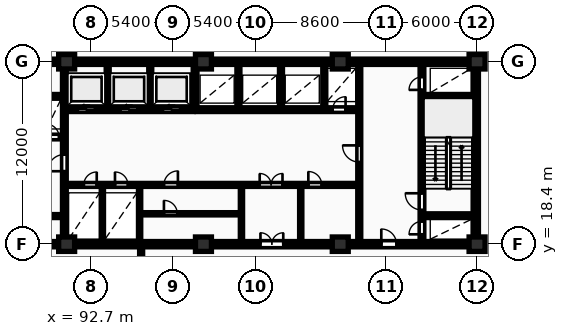
"""IFC4 building model, lengths in metres.
Left out: names, types, materials, properties, quantities, classifications, styles, units other than length and angle.
Written with IfcOpenShell. Run it as: python <this file> out.ifc"""

import sys

from ifc_helpers import new_model, si_unit, direction, frame, frame_2d, origin, origin_2d, place, context, subcontext, project, spatial, rectangle, extrude, element, fill, save


model = new_model("IFC4")
c1 = context("Model", 3, precision=1e-05, world=origin(), true_north=direction((0.0, 1.0)))
c2 = subcontext(c1, "Body", "Model", "MODEL_VIEW")
j1 = project(units=[si_unit("LENGTHUNIT", "METRE"), si_unit("PLANEANGLEUNIT", "RADIAN")], contexts=[c1])
p1 = place(None, origin())
s1 = spatial("IfcSite", under=j1, at=p1, CompositionType="ELEMENT")
p2 = place(p1, origin())
s2 = spatial("IfcBuilding", under=s1, at=p2, CompositionType="ELEMENT")
p3 = place(p2, frame((0.0, 0.0, 5.4)))
s3 = spatial("IfcBuildingStorey", under=s2, at=p3, CompositionType="ELEMENT", Elevation=5.4)
for number, where, z_axis, x_axis in (
    (1, (91.1, 18.4, 0.0), (0.0, 0.0, 1.0), (1.0, 0.0, 0.0)),
    (2, (91.1, 30.4, 0.0), (0.0, 0.0, 1.0), (1.0, 0.0, 0.0)),
    (3, (100.1, 18.4, 0.0), (0.0, 0.0, 1.0), (1.0, 0.0, 0.0)),
    (4, (100.1, 30.4, 0.0), (0.0, 0.0, 1.0), (1.0, 0.0, 0.0)),
    (5, (109.1, 18.4, 0.0), (0.0, 0.0, 1.0), (1.0, 0.0, 0.0)),
    (6, (109.1, 30.4, 0.0), (0.0, 0.0, 1.0), (1.0, 0.0, 0.0)),
    (7, (118.1, 18.4, 0.0), (0.0, 0.0, 1.0), (1.0, 0.0, 0.0)),
    (8, (118.1, 30.4, 0.0), (0.0, 0.0, 1.0), (1.0, 0.0, 0.0)),
):
    element("IfcColumn", number, at=place(p3, frame(where, z_axis=z_axis, x_axis=x_axis)), inside=s3, PredefinedType="COLUMN", context=c2, shape_type="SweptSolid", body=[
        extrude(rectangle(XDim=1.05, YDim=0.95, at=origin_2d()), origin(), (0.0, 0.0, 1.0), 4.6),
    ])
p4 = place(p3, frame((81.925, 30.4, 0.0), z_axis=(0.0, 0.0, 1.0), x_axis=(1.0, 0.0, 0.0)))
e9 = element("IfcWall", 9, at=p4, inside=s3, PredefinedType="SHEAR", context=c2, shape_type="SweptSolid", body=[
    extrude(rectangle(XDim=36.265, YDim=0.35, at=frame_2d((18.132, 0.0))), origin(), (0.0, 0.0, 1.0), 4.6),
])
p5 = place(p3, frame((118.015, 18.575, 0.0), z_axis=(0.0, 0.0, 1.0), x_axis=(0.0, 1.0, 0.0)))
e10 = element("IfcWall", 10, at=p5, inside=s3, PredefinedType="SHEAR", context=c2, shape_type="SweptSolid", body=[
    extrude(rectangle(XDim=11.65, YDim=0.35, at=frame_2d((5.825, 0.0))), origin(), (0.0, 0.0, 1.0), 4.6),
])
p6 = place(p3, frame((81.925, 18.4, 0.0), z_axis=(0.0, 0.0, 1.0), x_axis=(1.0, 0.0, 0.0)))
e11 = element("IfcWall", 11, at=p6, inside=s3, PredefinedType="SHEAR", context=c2, shape_type="SweptSolid", body=[
    extrude(rectangle(XDim=36.265, YDim=0.35, at=frame_2d((18.132, 0.0))), origin(), (0.0, 0.0, 1.0), 4.6),
])
p7 = place(p6, frame((5.675, 0.0, 0.0)))
e12 = element("IfcOpeningElement", 12, at=p7, cuts=e11, PredefinedType="OPENING", context=c2, shape_type="SweptSolid", body=[
    extrude(rectangle(XDim=1.0, YDim=2.15, at=frame_2d((0.5, 1.075))), frame((0.0, 0.185, 0.0), z_axis=(0.0, -1.0, 0.0), x_axis=(1.0, 0.0, 0.0)), (0.0, 0.0, 1.0), 0.37),
])
p8 = place(p6, frame((21.925, 0.0, 0.0)))
e13 = element("IfcOpeningElement", 13, at=p8, cuts=e11, PredefinedType="OPENING", context=c2, shape_type="SweptSolid", body=[
    extrude(rectangle(XDim=1.5, YDim=2.2, at=frame_2d((0.75, 1.1))), frame((0.0, 0.185, 0.0), z_axis=(0.0, -1.0, 0.0), x_axis=(1.0, 0.0, 0.0)), (0.0, 0.0, 1.0), 0.37),
])
p9 = place(p6, frame((29.875, 0.0, 0.0)))
e14 = element("IfcOpeningElement", 14, at=p9, cuts=e11, PredefinedType="OPENING", context=c2, shape_type="SweptSolid", body=[
    extrude(rectangle(XDim=1.0, YDim=2.15, at=frame_2d((0.5, 1.075))), frame((0.0, 0.185, 0.0), z_axis=(0.0, -1.0, 0.0), x_axis=(1.0, 0.0, 0.0)), (0.0, 0.0, 1.0), 0.37),
])
p10 = place(p3, frame((83.0, 28.125, 0.0), z_axis=(0.0, 0.0, 1.0), x_axis=(1.0, 0.0, 0.0)))
e15 = element("IfcWall", 15, at=p10, inside=s3, PredefinedType="SHEAR", context=c2, shape_type="SweptSolid", body=[
    extrude(rectangle(XDim=7.82, YDim=0.25, at=frame_2d((3.91, 0.0))), origin(), (0.0, 0.0, 1.0), 4.6),
])
p11 = place(p3, frame((86.5, 25.45, 0.0), z_axis=(0.0, 0.0, 1.0), x_axis=(1.0, 0.0, 0.0)))
e16 = element("IfcWall", 16, at=p11, inside=s3, PredefinedType="SHEAR", context=c2, shape_type="SweptSolid", body=[
    extrude(rectangle(XDim=4.32, YDim=0.25, at=frame_2d((2.16, 0.0))), origin(), (0.0, 0.0, 1.0), 4.6),
])
p12 = place(p11, frame((1.14, 0.0, 0.0)))
e17 = element("IfcOpeningElement", 17, at=p12, cuts=e16, PredefinedType="OPENING", context=c2, shape_type="SweptSolid", body=[
    extrude(rectangle(XDim=1.12, YDim=2.12, at=frame_2d((0.56, 1.06))), frame((0.0, 0.135, 0.0), z_axis=(0.0, -1.0, 0.0), x_axis=(1.0, 0.0, 0.0)), (0.0, 0.0, 1.0), 0.27),
])
p13 = place(p11, frame((3.25, 0.0, 0.0)))
e18 = element("IfcOpeningElement", 18, at=p13, cuts=e16, PredefinedType="OPENING", context=c2, shape_type="SweptSolid", body=[
    extrude(rectangle(XDim=0.85, YDim=2.05, at=frame_2d((0.425, 1.025))), frame((0.0, 0.135, 0.0), z_axis=(0.0, -1.0, 0.0), x_axis=(1.0, 0.0, 0.0)), (0.0, 0.0, 1.0), 0.27),
])
p14 = place(p3, frame((86.5, 20.25, 0.0), z_axis=(0.0, 0.0, 1.0), x_axis=(1.0, 0.0, 0.0)))
e19 = element("IfcWall", 19, at=p14, inside=s3, PredefinedType="PARTITIONING", context=c2, shape_type="SweptSolid", body=[
    extrude(rectangle(XDim=4.32, YDim=0.2, at=frame_2d((2.16, 0.0))), origin(), (0.0, 0.0, 1.0), 4.3),
])
p15 = place(p14, frame((1.4, 0.0, 0.0)))
e20 = element("IfcOpeningElement", 20, at=p15, cuts=e19, PredefinedType="OPENING", context=c2, shape_type="SweptSolid", body=[
    extrude(rectangle(XDim=1.1, YDim=2.1, at=frame_2d((0.55, 1.05))), frame((0.0, 0.11, 0.0), z_axis=(0.0, -1.0, 0.0), x_axis=(1.0, 0.0, 0.0)), (0.0, 0.0, 1.0), 0.22),
])
p16 = place(p3, frame((90.95, 18.6, 0.0), z_axis=(0.0, 0.0, 1.0), x_axis=(0.0, 1.0, 0.0)))
e21 = element("IfcWall", 21, at=p16, inside=s3, PredefinedType="SHEAR", context=c2, shape_type="SweptSolid", body=[
    extrude(rectangle(XDim=11.6, YDim=0.25, at=frame_2d((5.8, 0.0))), origin(), (0.0, 0.0, 1.0), 4.6),
])
p17 = place(p16, frame((4.6, 0.0, 0.0)))
e22 = element("IfcOpeningElement", 22, at=p17, cuts=e21, PredefinedType="OPENING", context=c2, shape_type="SweptSolid", body=[
    extrude(rectangle(XDim=1.1, YDim=2.1, at=frame_2d((0.55, 1.05))), frame((0.0, 0.135, 0.0), z_axis=(0.0, -1.0, 0.0), x_axis=(1.0, 0.0, 0.0)), (0.0, 0.0, 1.0), 0.27),
])
for number, where, z_axis, x_axis in (
    (23, (93.8, 27.38, 0.0), (0.0, 0.0, 1.0), (0.0, 1.0, 0.0)),
    (24, (96.6, 27.38, 0.0), (0.0, 0.0, 1.0), (0.0, 1.0, 0.0)),
):
    element("IfcWall", number, at=place(p3, frame(where, z_axis=z_axis, x_axis=x_axis)), inside=s3, PredefinedType="PARTITIONING", context=c2, shape_type="SweptSolid", body=[
        extrude(rectangle(XDim=2.82, YDim=0.2, at=frame_2d((1.41, 0.0))), origin(), (0.0, 0.0, 1.0), 4.3),
    ])
p18 = place(p3, frame((91.08, 27.25, 0.0), z_axis=(0.0, 0.0, 1.0), x_axis=(1.0, 0.0, 0.0)))
e25 = element("IfcWall", 25, at=p18, inside=s3, PredefinedType="SHEAR", context=c2, shape_type="SweptSolid", body=[
    extrude(rectangle(XDim=8.34, YDim=0.25, at=frame_2d((4.17, 0.0))), origin(), (0.0, 0.0, 1.0), 4.6),
])
p19 = place(p18, frame((0.76, 0.0, 0.0)))
e26 = element("IfcOpeningElement", 26, at=p19, cuts=e25, PredefinedType="OPENING", context=c2, shape_type="SweptSolid", body=[
    extrude(rectangle(XDim=1.12, YDim=2.12, at=frame_2d((0.56, 1.06))), frame((0.0, 0.135, 0.0), z_axis=(0.0, -1.0, 0.0), x_axis=(1.0, 0.0, 0.0)), (0.0, 0.0, 1.0), 0.27),
])
p20 = place(p18, frame((3.56, 0.0, 0.0)))
e27 = element("IfcOpeningElement", 27, at=p20, cuts=e25, PredefinedType="OPENING", context=c2, shape_type="SweptSolid", body=[
    extrude(rectangle(XDim=1.12, YDim=2.12, at=frame_2d((0.56, 1.06))), frame((0.0, 0.135, 0.0), z_axis=(0.0, -1.0, 0.0), x_axis=(1.0, 0.0, 0.0)), (0.0, 0.0, 1.0), 0.27),
])
p21 = place(p18, frame((6.36, 0.0, 0.0)))
e28 = element("IfcOpeningElement", 28, at=p21, cuts=e25, PredefinedType="OPENING", context=c2, shape_type="SweptSolid", body=[
    extrude(rectangle(XDim=1.12, YDim=2.12, at=frame_2d((0.56, 1.06))), frame((0.0, 0.135, 0.0), z_axis=(0.0, -1.0, 0.0), x_axis=(1.0, 0.0, 0.0)), (0.0, 0.0, 1.0), 0.27),
])
p22 = place(p3, frame((99.55, 27.25, 0.0), z_axis=(0.0, 0.0, 1.0), x_axis=(0.0, 1.0, 0.0)))
e29 = element("IfcWall", 29, at=p22, inside=s3, PredefinedType="SHEAR", context=c2, shape_type="SweptSolid", body=[
    extrude(rectangle(XDim=2.95, YDim=0.25, at=frame_2d((1.475, 0.0))), origin(), (0.0, 0.0, 1.0), 4.6),
])
for number, where, z_axis, x_axis in (
    (30, (102.4, 27.38, 0.0), (0.0, 0.0, 1.0), (0.0, 1.0, 0.0)),
    (31, (105.2, 27.38, 0.0), (0.0, 0.0, 1.0), (0.0, 1.0, 0.0)),
    (32, (108.05, 27.38, 0.0), (0.0, 0.0, 1.0), (0.0, 1.0, 0.0)),
):
    element("IfcWall", number, at=place(p3, frame(where, z_axis=z_axis, x_axis=x_axis)), inside=s3, PredefinedType="PARTITIONING", context=c2, shape_type="SweptSolid", body=[
        extrude(rectangle(XDim=2.82, YDim=0.2, at=frame_2d((1.41, 0.0))), origin(), (0.0, 0.0, 1.0), 4.3),
    ])
p23 = place(p3, frame((99.68, 27.25, 0.0), z_axis=(0.0, 0.0, 1.0), x_axis=(1.0, 0.0, 0.0)))
e33 = element("IfcWall", 33, at=p23, inside=s3, PredefinedType="SHEAR", context=c2, shape_type="SweptSolid", body=[
    extrude(rectangle(XDim=10.54, YDim=0.25, at=frame_2d((5.27, 0.0))), origin(), (0.0, 0.0, 1.0), 4.6),
])
p24 = place(p23, frame((8.92, 0.0, 0.0)))
e34 = element("IfcOpeningElement", 34, at=p24, cuts=e33, PredefinedType="OPENING", context=c2, shape_type="SweptSolid", body=[
    extrude(rectangle(XDim=0.85, YDim=2.05, at=frame_2d((0.425, 1.025))), frame((0.0, 0.135, 0.0), z_axis=(0.0, -1.0, 0.0), x_axis=(1.0, 0.0, 0.0)), (0.0, 0.0, 1.0), 0.27),
])
for number, where, z_axis, x_axis in (
    (35, (93.45, 18.6, 0.0), (0.0, 0.0, 1.0), (0.0, 1.0, 0.0)),
    (36, (95.9, 18.6, 0.0), (0.0, 0.0, 1.0), (0.0, 1.0, 0.0)),
):
    element("IfcWall", number, at=place(p3, frame(where, z_axis=z_axis, x_axis=x_axis)), inside=s3, PredefinedType="PARTITIONING", context=c2, shape_type="SweptSolid", body=[
        extrude(rectangle(XDim=3.6, YDim=0.15, at=frame_2d((1.8, 0.0))), origin(), (0.0, 0.0, 1.0), 4.3),
    ])
p25 = place(p3, frame((95.9, 20.4, 0.0), z_axis=(0.0, 0.0, 1.0), x_axis=(1.0, 0.0, 0.0)))
e37 = element("IfcWall", 37, at=p25, inside=s3, PredefinedType="PARTITIONING", context=c2, shape_type="SweptSolid", body=[
    extrude(rectangle(XDim=6.7, YDim=0.15, at=frame_2d((3.35, 0.0))), origin(), (0.0, 0.0, 1.0), 4.3),
])
p26 = place(p25, frame((1.6, 0.0, 0.0)))
e38 = element("IfcOpeningElement", 38, at=p26, cuts=e37, PredefinedType="OPENING", context=c2, shape_type="SweptSolid", body=[
    extrude(rectangle(XDim=0.88, YDim=2.06, at=frame_2d((0.44, 1.03))), frame((0.0, 0.085, 0.0), z_axis=(0.0, -1.0, 0.0), x_axis=(1.0, 0.0, 0.0)), (0.0, 0.0, 1.0), 0.17),
])
for number, where, z_axis, x_axis in (
    (39, (102.6, 18.6, 0.0), (0.0, 0.0, 1.0), (0.0, 1.0, 0.0)),
    (40, (106.5, 18.6, 0.0), (0.0, 0.0, 1.0), (0.0, 1.0, 0.0)),
):
    element("IfcWall", number, at=place(p3, frame(where, z_axis=z_axis, x_axis=x_axis)), inside=s3, PredefinedType="PARTITIONING", context=c2, shape_type="SweptSolid", body=[
        extrude(rectangle(XDim=3.6, YDim=0.15, at=frame_2d((1.8, 0.0))), origin(), (0.0, 0.0, 1.0), 4.3),
    ])
p27 = place(p3, frame((91.08, 22.3, 0.0), z_axis=(0.0, 0.0, 1.0), x_axis=(1.0, 0.0, 0.0)))
e41 = element("IfcWall", 41, at=p27, inside=s3, PredefinedType="PARTITIONING", context=c2, shape_type="SweptSolid", body=[
    extrude(rectangle(XDim=19.14, YDim=0.2, at=frame_2d((9.57, 0.0))), origin(), (0.0, 0.0, 1.0), 4.3),
])
p28 = place(p27, frame((1.15, 0.0, 0.0)))
e42 = element("IfcOpeningElement", 42, at=p28, cuts=e41, PredefinedType="OPENING", context=c2, shape_type="SweptSolid", body=[
    extrude(rectangle(XDim=0.85, YDim=2.05, at=frame_2d((0.425, 1.025))), frame((0.0, 0.11, 0.0), z_axis=(0.0, -1.0, 0.0), x_axis=(1.0, 0.0, 0.0)), (0.0, 0.0, 1.0), 0.22),
])
p29 = place(p27, frame((3.2, 0.0, 0.0)))
e43 = element("IfcOpeningElement", 43, at=p29, cuts=e41, PredefinedType="OPENING", context=c2, shape_type="SweptSolid", body=[
    extrude(rectangle(XDim=0.85, YDim=2.05, at=frame_2d((0.425, 1.025))), frame((0.0, 0.11, 0.0), z_axis=(0.0, -1.0, 0.0), x_axis=(1.0, 0.0, 0.0)), (0.0, 0.0, 1.0), 0.22),
])
p30 = place(p27, frame((12.72, 0.0, 0.0)))
e44 = element("IfcOpeningElement", 44, at=p30, cuts=e41, PredefinedType="OPENING", context=c2, shape_type="SweptSolid", body=[
    extrude(rectangle(XDim=1.5, YDim=2.2, at=frame_2d((0.75, 1.1))), frame((0.0, 0.11, 0.0), z_axis=(0.0, -1.0, 0.0), x_axis=(1.0, 0.0, 0.0)), (0.0, 0.0, 1.0), 0.22),
])
p31 = place(p27, frame((6.42, 0.0, 0.0)))
e45 = element("IfcOpeningElement", 45, at=p31, cuts=e41, PredefinedType="OPENING", context=c2, shape_type="SweptSolid", body=[
    extrude(rectangle(XDim=0.92, YDim=2.08, at=frame_2d((0.46, 1.04))), frame((0.0, 0.11, 0.0), z_axis=(0.0, -1.0, 0.0), x_axis=(1.0, 0.0, 0.0)), (0.0, 0.0, 1.0), 0.22),
])
p32 = place(p27, frame((15.92, 0.0, 0.0)))
e46 = element("IfcOpeningElement", 46, at=p32, cuts=e41, PredefinedType="OPENING", context=c2, shape_type="SweptSolid", body=[
    extrude(rectangle(XDim=0.88, YDim=2.06, at=frame_2d((0.44, 1.03))), frame((0.0, 0.11, 0.0), z_axis=(0.0, -1.0, 0.0), x_axis=(1.0, 0.0, 0.0)), (0.0, 0.0, 1.0), 0.22),
])
p33 = place(p3, frame((110.35, 18.6, 0.0), z_axis=(0.0, 0.0, 1.0), x_axis=(0.0, 1.0, 0.0)))
e47 = element("IfcWall", 47, at=p33, inside=s3, PredefinedType="PARTITIONING", context=c2, shape_type="SweptSolid", body=[
    extrude(rectangle(XDim=11.6, YDim=0.2, at=frame_2d((5.8, 0.0))), origin(), (0.0, 0.0, 1.0), 4.3),
])
p34 = place(p33, frame((5.2, 0.0, 0.0)))
e48 = element("IfcOpeningElement", 48, at=p34, cuts=e47, PredefinedType="OPENING", context=c2, shape_type="SweptSolid", body=[
    extrude(rectangle(XDim=1.1, YDim=2.15, at=frame_2d((0.55, 1.075))), frame((0.0, 0.11, 0.0), z_axis=(0.0, -1.0, 0.0), x_axis=(1.0, 0.0, 0.0)), (0.0, 0.0, 1.0), 0.22),
])
p35 = place(p3, frame((114.475, 18.6, 0.0), z_axis=(0.0, 0.0, 1.0), x_axis=(0.0, 1.0, 0.0)))
e49 = element("IfcWall", 49, at=p35, inside=s3, PredefinedType="SHEAR", context=c2, shape_type="SweptSolid", body=[
    extrude(rectangle(XDim=11.6, YDim=0.25, at=frame_2d((5.8, 0.0))), origin(), (0.0, 0.0, 1.0), 4.6),
])
p36 = place(p35, frame((0.45, 0.0, 0.0)))
e50 = element("IfcOpeningElement", 50, at=p36, cuts=e49, PredefinedType="OPENING", context=c2, shape_type="SweptSolid", body=[
    extrude(rectangle(XDim=0.85, YDim=2.05, at=frame_2d((0.425, 1.025))), frame((0.0, 0.135, 0.0), z_axis=(0.0, -1.0, 0.0), x_axis=(1.0, 0.0, 0.0)), (0.0, 0.0, 1.0), 0.27),
])
p37 = place(p35, frame((2.05, 0.0, 0.0)))
e51 = element("IfcOpeningElement", 51, at=p37, cuts=e49, PredefinedType="OPENING", context=c2, shape_type="SweptSolid", body=[
    extrude(rectangle(XDim=1.1, YDim=2.1, at=frame_2d((0.55, 1.05))), frame((0.0, 0.135, 0.0), z_axis=(0.0, -1.0, 0.0), x_axis=(1.0, 0.0, 0.0)), (0.0, 0.0, 1.0), 0.27),
])
p38 = place(p35, frame((9.95, 0.0, 0.0)))
e52 = element("IfcOpeningElement", 52, at=p38, cuts=e49, PredefinedType="OPENING", context=c2, shape_type="SweptSolid", body=[
    extrude(rectangle(XDim=0.85, YDim=2.05, at=frame_2d((0.425, 1.025))), frame((0.0, 0.135, 0.0), z_axis=(0.0, -1.0, 0.0), x_axis=(1.0, 0.0, 0.0)), (0.0, 0.0, 1.0), 0.27),
])
for number, where, z_axis, x_axis in (
    (53, (114.6, 20.275, 0.0), (0.0, 0.0, 1.0), (1.0, 0.0, 0.0)),
    (54, (114.6, 28.125, 0.0), (0.0, 0.0, 1.0), (1.0, 0.0, 0.0)),
):
    element("IfcWall", number, at=place(p3, frame(where, z_axis=z_axis, x_axis=x_axis)), inside=s3, PredefinedType="SHEAR", context=c2, shape_type="SweptSolid", body=[
        extrude(rectangle(XDim=3.24, YDim=0.25, at=frame_2d((1.62, 0.0))), origin(), (0.0, 0.0, 1.0), 4.6),
    ])
p39 = place(p3, frame((96.0, -23.2, 0.0), z_axis=(0.0, 0.0, 1.0), x_axis=(0.0, 1.0, 0.0)))
e55 = element("IfcWall", 55, at=p39, inside=s3, PredefinedType="PARTITIONING", context=c2, shape_type="SweptSolid", body=[
    extrude(rectangle(XDim=41.45, YDim=0.2, at=frame_2d((20.725, 0.0))), origin(), (0.0, 0.0, 1.0), 4.3),
])
p40 = place(p39, frame((9.5, 0.0, 0.0)))
e56 = element("IfcOpeningElement", 56, at=p40, cuts=e55, PredefinedType="OPENING", context=c2, shape_type="SweptSolid", body=[
    extrude(rectangle(XDim=1.22, YDim=2.18, at=frame_2d((0.61, 1.09))), frame((0.0, 0.11, 0.0), z_axis=(0.0, -1.0, 0.0), x_axis=(1.0, 0.0, 0.0)), (0.0, 0.0, 1.0), 0.22),
])
p41 = place(p8, origin())
e57 = element("IfcDoor", 57, at=p41, inside=s3, OperationType="DOUBLE_DOOR_SINGLE_SWING", PredefinedType="DOOR", context=c2, shape_type="SweptSolid", body=[
    extrude(rectangle(XDim=1.5, YDim=2.2, at=frame_2d((0.75, 1.1))), frame((0.0, 0.025, 0.0), z_axis=(0.0, -1.0, 0.0), x_axis=(1.0, 0.0, 0.0)), (0.0, 0.0, 1.0), 0.05),
])
fill(e13, e57)
p42 = place(p9, origin())
e58 = element("IfcDoor", 58, at=p42, inside=s3, OperationType="SINGLE_SWING_LEFT", PredefinedType="DOOR", context=c2, shape_type="SweptSolid", body=[
    extrude(rectangle(XDim=1.0, YDim=2.15, at=frame_2d((0.5, 1.075))), frame((0.0, 0.025, 0.0), z_axis=(0.0, -1.0, 0.0), x_axis=(1.0, 0.0, 0.0)), (0.0, 0.0, 1.0), 0.05),
])
fill(e14, e58)
p43 = place(p13, origin())
e59 = element("IfcDoor", 59, at=p43, inside=s3, OperationType="SINGLE_SWING_LEFT", PredefinedType="DOOR", context=c2, shape_type="SweptSolid", body=[
    extrude(rectangle(XDim=0.85, YDim=2.05, at=frame_2d((0.425, 1.025))), frame((0.0, 0.025, 0.0), z_axis=(0.0, -1.0, 0.0), x_axis=(1.0, 0.0, 0.0)), (0.0, 0.0, 1.0), 0.05),
])
fill(e18, e59)
p44 = place(p17, origin())
e60 = element("IfcDoor", 60, at=p44, inside=s3, OperationType="SINGLE_SWING_LEFT", PredefinedType="DOOR", context=c2, shape_type="SweptSolid", body=[
    extrude(rectangle(XDim=1.1, YDim=2.1, at=frame_2d((0.55, 1.05))), frame((0.0, 0.025, 0.0), z_axis=(0.0, -1.0, 0.0), x_axis=(1.0, 0.0, 0.0)), (0.0, 0.0, 1.0), 0.05),
])
fill(e22, e60)
p45 = place(p19, origin())
e61 = element("IfcDoor", 61, at=p45, inside=s3, OperationType="SLIDING_TO_LEFT", PredefinedType="DOOR", context=c2, shape_type="SweptSolid", body=[
    extrude(rectangle(XDim=1.12, YDim=2.12, at=frame_2d((0.56, 1.06))), frame((0.0, 0.025, 0.0), z_axis=(0.0, -1.0, 0.0), x_axis=(1.0, 0.0, 0.0)), (0.0, 0.0, 1.0), 0.05),
])
fill(e26, e61)
p46 = place(p20, origin())
e62 = element("IfcDoor", 62, at=p46, inside=s3, OperationType="SLIDING_TO_LEFT", PredefinedType="DOOR", context=c2, shape_type="SweptSolid", body=[
    extrude(rectangle(XDim=1.12, YDim=2.12, at=frame_2d((0.56, 1.06))), frame((0.0, 0.025, 0.0), z_axis=(0.0, -1.0, 0.0), x_axis=(1.0, 0.0, 0.0)), (0.0, 0.0, 1.0), 0.05),
])
fill(e27, e62)
p47 = place(p21, origin())
e63 = element("IfcDoor", 63, at=p47, inside=s3, OperationType="SLIDING_TO_LEFT", PredefinedType="DOOR", context=c2, shape_type="SweptSolid", body=[
    extrude(rectangle(XDim=1.12, YDim=2.12, at=frame_2d((0.56, 1.06))), frame((0.0, 0.025, 0.0), z_axis=(0.0, -1.0, 0.0), x_axis=(1.0, 0.0, 0.0)), (0.0, 0.0, 1.0), 0.05),
])
fill(e28, e63)
p48 = place(p24, origin())
e64 = element("IfcDoor", 64, at=p48, inside=s3, OperationType="SINGLE_SWING_RIGHT", PredefinedType="DOOR", context=c2, shape_type="SweptSolid", body=[
    extrude(rectangle(XDim=0.85, YDim=2.05, at=frame_2d((0.425, 1.025))), frame((0.0, 0.025, 0.0), z_axis=(0.0, -1.0, 0.0), x_axis=(1.0, 0.0, 0.0)), (0.0, 0.0, 1.0), 0.05),
])
fill(e34, e64)
p49 = place(p26, origin())
e65 = element("IfcDoor", 65, at=p49, inside=s3, OperationType="SINGLE_SWING_LEFT", PredefinedType="DOOR", context=c2, shape_type="SweptSolid", body=[
    extrude(rectangle(XDim=0.88, YDim=2.06, at=frame_2d((0.44, 1.03))), frame((0.0, 0.025, 0.0), z_axis=(0.0, -1.0, 0.0), x_axis=(1.0, 0.0, 0.0)), (0.0, 0.0, 1.0), 0.05),
])
fill(e38, e65)
p50 = place(p28, origin())
e66 = element("IfcDoor", 66, at=p50, inside=s3, OperationType="SINGLE_SWING_RIGHT", PredefinedType="DOOR", context=c2, shape_type="SweptSolid", body=[
    extrude(rectangle(XDim=0.85, YDim=2.05, at=frame_2d((0.425, 1.025))), frame((0.0, 0.025, 0.0), z_axis=(0.0, -1.0, 0.0), x_axis=(1.0, 0.0, 0.0)), (0.0, 0.0, 1.0), 0.05),
])
fill(e42, e66)
p51 = place(p29, origin())
e67 = element("IfcDoor", 67, at=p51, inside=s3, OperationType="SINGLE_SWING_LEFT", PredefinedType="DOOR", context=c2, shape_type="SweptSolid", body=[
    extrude(rectangle(XDim=0.85, YDim=2.05, at=frame_2d((0.425, 1.025))), frame((0.0, 0.025, 0.0), z_axis=(0.0, -1.0, 0.0), x_axis=(1.0, 0.0, 0.0)), (0.0, 0.0, 1.0), 0.05),
])
fill(e43, e67)
p52 = place(p30, origin())
e68 = element("IfcDoor", 68, at=p52, inside=s3, OperationType="DOUBLE_DOOR_SINGLE_SWING", PredefinedType="DOOR", context=c2, shape_type="SweptSolid", body=[
    extrude(rectangle(XDim=1.5, YDim=2.2, at=frame_2d((0.75, 1.1))), frame((0.0, 0.025, 0.0), z_axis=(0.0, -1.0, 0.0), x_axis=(1.0, 0.0, 0.0)), (0.0, 0.0, 1.0), 0.05),
])
fill(e44, e68)
p53 = place(p31, origin())
e69 = element("IfcDoor", 69, at=p53, inside=s3, OperationType="SINGLE_SWING_RIGHT", PredefinedType="DOOR", context=c2, shape_type="SweptSolid", body=[
    extrude(rectangle(XDim=0.92, YDim=2.08, at=frame_2d((0.46, 1.04))), frame((0.0, 0.025, 0.0), z_axis=(0.0, -1.0, 0.0), x_axis=(1.0, 0.0, 0.0)), (0.0, 0.0, 1.0), 0.05),
])
fill(e45, e69)
p54 = place(p32, origin())
e70 = element("IfcDoor", 70, at=p54, inside=s3, OperationType="SINGLE_SWING_LEFT", PredefinedType="DOOR", context=c2, shape_type="SweptSolid", body=[
    extrude(rectangle(XDim=0.88, YDim=2.06, at=frame_2d((0.44, 1.03))), frame((0.0, 0.025, 0.0), z_axis=(0.0, -1.0, 0.0), x_axis=(1.0, 0.0, 0.0)), (0.0, 0.0, 1.0), 0.05),
])
fill(e46, e70)
p55 = place(p34, origin())
e71 = element("IfcDoor", 71, at=p55, inside=s3, OperationType="SINGLE_SWING_RIGHT", PredefinedType="DOOR", context=c2, shape_type="SweptSolid", body=[
    extrude(rectangle(XDim=1.1, YDim=2.15, at=frame_2d((0.55, 1.075))), frame((0.0, 0.025, 0.0), z_axis=(0.0, -1.0, 0.0), x_axis=(1.0, 0.0, 0.0)), (0.0, 0.0, 1.0), 0.05),
])
fill(e48, e71)
p56 = place(p36, origin())
e72 = element("IfcDoor", 72, at=p56, inside=s3, OperationType="SINGLE_SWING_LEFT", PredefinedType="DOOR", context=c2, shape_type="SweptSolid", body=[
    extrude(rectangle(XDim=0.85, YDim=2.05, at=frame_2d((0.425, 1.025))), frame((0.0, 0.025, 0.0), z_axis=(0.0, -1.0, 0.0), x_axis=(1.0, 0.0, 0.0)), (0.0, 0.0, 1.0), 0.05),
])
fill(e50, e72)
p57 = place(p37, origin())
e73 = element("IfcDoor", 73, at=p57, inside=s3, OperationType="SINGLE_SWING_RIGHT", PredefinedType="DOOR", context=c2, shape_type="SweptSolid", body=[
    extrude(rectangle(XDim=1.1, YDim=2.1, at=frame_2d((0.55, 1.05))), frame((0.0, 0.025, 0.0), z_axis=(0.0, -1.0, 0.0), x_axis=(1.0, 0.0, 0.0)), (0.0, 0.0, 1.0), 0.05),
])
fill(e51, e73)
p58 = place(p38, origin())
e74 = element("IfcDoor", 74, at=p58, inside=s3, OperationType="SINGLE_SWING_LEFT", PredefinedType="DOOR", context=c2, shape_type="SweptSolid", body=[
    extrude(rectangle(XDim=0.85, YDim=2.05, at=frame_2d((0.425, 1.025))), frame((0.0, 0.025, 0.0), z_axis=(0.0, -1.0, 0.0), x_axis=(1.0, 0.0, 0.0)), (0.0, 0.0, 1.0), 0.05),
])
fill(e52, e74)
save(model, sys.argv[1])
